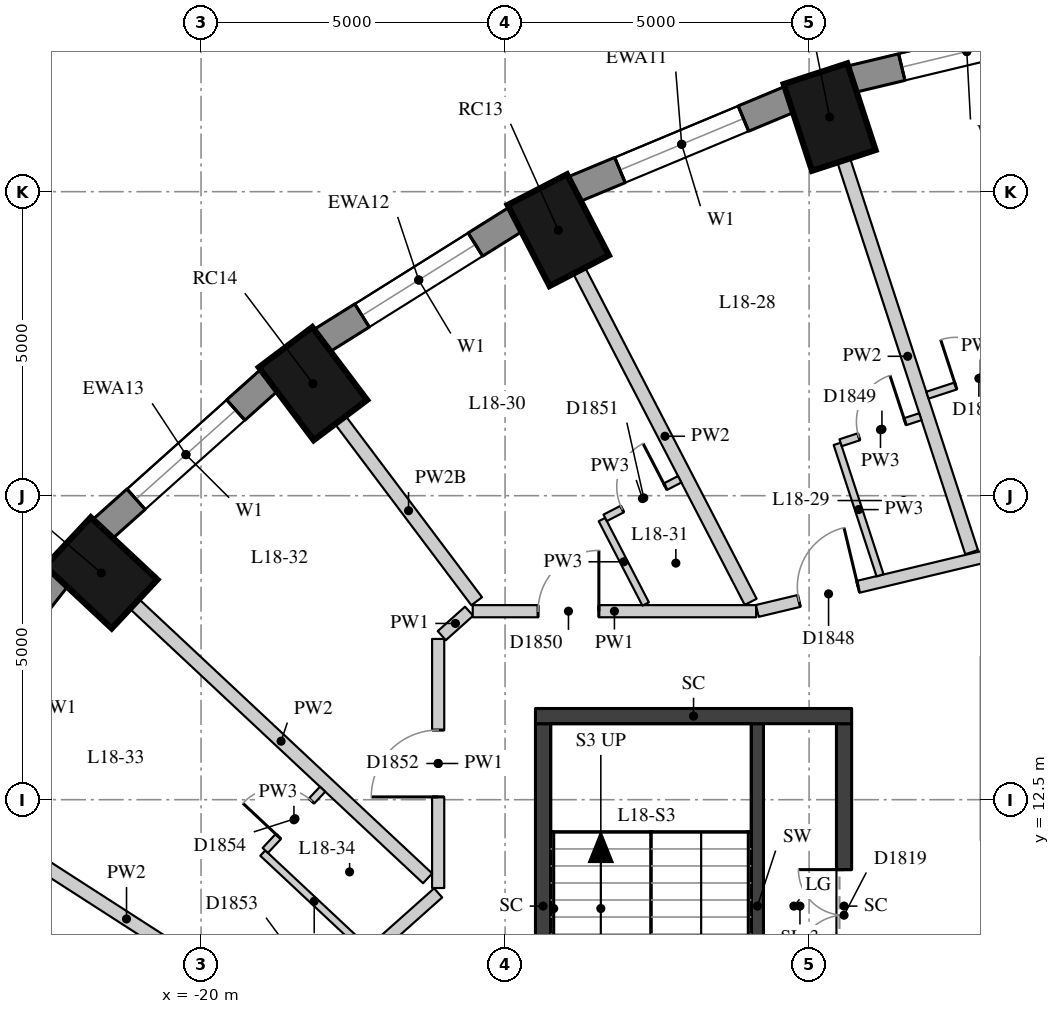
"""IFC4 building model, lengths in metres.
Left out: names, types, materials, properties, quantities, classifications, styles, units other than length and angle.
Written with IfcOpenShell. Run it as: python <this file> out.ifc"""

import sys

from ifc_helpers import new_model, si_unit, direction, frame, frame_2d, origin, origin_2d, place, context, subcontext, project, spatial, rectangle, extrude, element, fill, save


model = new_model("IFC4")
c1 = context("Model", 3, precision=1e-05, world=origin(), true_north=direction((0.0, 1.0)))
c2 = subcontext(c1, "Body", "Model", "MODEL_VIEW")
j1 = project(units=[si_unit("LENGTHUNIT", "METRE"), si_unit("PLANEANGLEUNIT", "RADIAN")], contexts=[c1])
p1 = place(None, origin())
s1 = spatial("IfcSite", under=j1, at=p1, CompositionType="ELEMENT")
p2 = place(p1, origin())
s2 = spatial("IfcBuilding", under=s1, at=p2, CompositionType="ELEMENT")
p3 = place(p2, frame((0.0, 0.0, 67.9)))
s3 = spatial("IfcBuildingStorey", under=s2, at=p3, CompositionType="ELEMENT", Elevation=67.9)
for number, where, z_axis, x_axis in (
    (1, (-9.662, 23.727, 0.0), (0.0, 0.0, 1.0), (-0.31, 0.951, 0.0)),
    (2, (-14.125, 21.867, 0.0), (0.0, 0.0, 1.0), (-0.46, 0.888, 0.0)),
    (3, (-18.159, 19.343, 0.0), (0.0, 0.0, 1.0), (-0.601, 0.799, 0.0)),
    (4, (-21.641, 16.23, 0.0), (0.0, 0.0, 1.0), (-0.73, 0.683, 0.0)),
):
    element("IfcColumn", number, at=place(p3, frame(where, z_axis=z_axis, x_axis=x_axis)), inside=s3, PredefinedType="COLUMN", context=c2, shape_type="SweptSolid", body=[
        extrude(rectangle(XDim=1.5, YDim=1.1, at=origin_2d()), origin(), (0.0, 0.0, 1.0), 3.3),
    ])
p4 = place(p3, frame((-5.504, 25.26, 0.0), z_axis=(0.0, 0.0, 1.0), x_axis=(-0.972496561493, -0.232917233979, 0.0)))
e5 = element("IfcWall", 5, at=p4, inside=s3, PredefinedType="SOLIDWALL", context=c2, shape_type="SweptSolid", body=[
    extrude(rectangle(XDim=3.911, YDim=0.45, at=frame_2d((1.956, 0.0))), origin(), (0.0, 0.0, 1.0), 3.02),
])
p5 = place(p4, frame((0.855, 0.0, 0.4)))
e6 = element("IfcOpeningElement", 6, at=p5, cuts=e5, PredefinedType="OPENING", context=c2, shape_type="SweptSolid", body=[
    extrude(rectangle(XDim=2.2, YDim=1.75, at=frame_2d((1.1, 0.875))), frame((0.0, 0.235, 0.0), z_axis=(0.0, -1.0, 0.0), x_axis=(1.0, 0.0, 0.0)), (0.0, 0.0, 1.0), 0.47),
])
p6 = place(p3, frame((-10.315, 24.021, 0.0), z_axis=(0.0, 0.0, 1.0), x_axis=(-0.923031964282, -0.384723267966, 0.0)))
e7 = element("IfcWall", 7, at=p6, inside=s3, PredefinedType="SOLIDWALL", context=c2, shape_type="SweptSolid", body=[
    extrude(rectangle(XDim=3.856, YDim=0.45, at=frame_2d((1.928, 0.0))), origin(), (0.0, 0.0, 1.0), 3.02),
])
p7 = place(p6, frame((0.828, 0.0, 0.4)))
e8 = element("IfcOpeningElement", 8, at=p7, cuts=e7, PredefinedType="OPENING", context=c2, shape_type="SweptSolid", body=[
    extrude(rectangle(XDim=2.2, YDim=1.75, at=frame_2d((1.1, 0.875))), frame((0.0, 0.235, 0.0), z_axis=(0.0, -1.0, 0.0), x_axis=(1.0, 0.0, 0.0)), (0.0, 0.0, 1.0), 0.47),
])
p8 = place(p3, frame((-14.817, 22.051, 0.0), z_axis=(0.0, 0.0, 1.0), x_axis=(-0.847635480093, -0.530579016629, 0.0)))
e9 = element("IfcWall", 9, at=p8, inside=s3, PredefinedType="SOLIDWALL", context=c2, shape_type="SweptSolid", body=[
    extrude(rectangle(XDim=3.782, YDim=0.45, at=frame_2d((1.891, 0.0))), origin(), (0.0, 0.0, 1.0), 3.02),
])
p9 = place(p8, frame((0.791, 0.0, 0.4)))
e10 = element("IfcOpeningElement", 10, at=p9, cuts=e9, PredefinedType="OPENING", context=c2, shape_type="SweptSolid", body=[
    extrude(rectangle(XDim=2.2, YDim=1.75, at=frame_2d((1.1, 0.875))), frame((0.0, 0.235, 0.0), z_axis=(0.0, -1.0, 0.0), x_axis=(1.0, 0.0, 0.0)), (0.0, 0.0, 1.0), 0.47),
])
p10 = place(p3, frame((-18.871, 19.407, 0.0), z_axis=(0.0, 0.0, 1.0), x_axis=(-0.745526233716, -0.66647628228, 0.0)))
e11 = element("IfcWall", 11, at=p10, inside=s3, PredefinedType="SOLIDWALL", context=c2, shape_type="SweptSolid", body=[
    extrude(rectangle(XDim=3.697, YDim=0.45, at=frame_2d((1.848, 0.0))), origin(), (0.0, 0.0, 1.0), 3.02),
])
p11 = place(p10, frame((0.749, 0.0, 0.4)))
e12 = element("IfcOpeningElement", 12, at=p11, cuts=e11, PredefinedType="OPENING", context=c2, shape_type="SweptSolid", body=[
    extrude(rectangle(XDim=2.2, YDim=1.75, at=frame_2d((1.1, 0.875))), frame((0.0, 0.235, 0.0), z_axis=(0.0, -1.0, 0.0), x_axis=(1.0, 0.0, 0.0)), (0.0, 0.0, 1.0), 0.47),
])
p12 = place(p3, frame((-22.352, 16.17, 0.0), z_axis=(0.0, 0.0, 1.0), x_axis=(-0.616661975264, -0.787228053529, 0.0)))
e13 = element("IfcWall", 13, at=p12, inside=s3, PredefinedType="SOLIDWALL", context=c2, shape_type="SweptSolid", body=[
    extrude(rectangle(XDim=3.61, YDim=0.45, at=frame_2d((1.805, 0.0))), origin(), (0.0, 0.0, 1.0), 3.02),
])
p13 = place(p12, frame((0.705, 0.0, 0.4)))
e14 = element("IfcOpeningElement", 14, at=p13, cuts=e13, PredefinedType="OPENING", context=c2, shape_type="SweptSolid", body=[
    extrude(rectangle(XDim=2.2, YDim=1.75, at=frame_2d((1.1, 0.875))), frame((0.0, 0.235, 0.0), z_axis=(0.0, -1.0, 0.0), x_axis=(1.0, 0.0, 0.0)), (0.0, 0.0, 1.0), 0.47),
])
p14 = place(p3, frame((-10.85, 7.75, 0.0), z_axis=(0.0, 0.0, 1.0), x_axis=(0.0, 1.0, 0.0)))
e15 = element("IfcWall", 15, at=p14, inside=s3, PredefinedType="SHEAR", context=c2, shape_type="SweptSolid", body=[
    extrude(rectangle(XDim=6.0, YDim=0.2, at=frame_2d((3.0, 0.0))), origin(), (0.0, 0.0, 1.0), 3.02),
])
p15 = place(p14, frame((0.1, 0.0, 0.0)))
e16 = element("IfcOpeningElement", 16, at=p15, cuts=e15, PredefinedType="OPENING", context=c2, shape_type="SweptSolid", body=[
    extrude(rectangle(XDim=1.5, YDim=2.1, at=frame_2d((0.75, 1.05))), frame((0.0, 0.11, 0.0), z_axis=(0.0, -1.0, 0.0), x_axis=(1.0, 0.0, 0.0)), (0.0, 0.0, 1.0), 0.22),
])
p16 = place(p3, frame((-14.375, 7.75, -0.28), z_axis=(0.0, 0.0, 1.0), x_axis=(0.0, 1.0, 0.0)))
e17 = element("IfcWall", 17, at=p16, inside=s3, PredefinedType="SHEAR", context=c2, shape_type="SweptSolid", body=[
    extrude(rectangle(XDim=6.0, YDim=0.25, at=frame_2d((3.0, 0.0))), origin(), (0.0, 0.0, 1.0), 3.3),
])
p17 = place(p3, frame((-9.425, 7.75, -0.28), z_axis=(0.0, 0.0, 1.0), x_axis=(0.0, 1.0, 0.0)))
e18 = element("IfcWall", 18, at=p17, inside=s3, PredefinedType="SHEAR", context=c2, shape_type="SweptSolid", body=[
    extrude(rectangle(XDim=6.0, YDim=0.25, at=frame_2d((3.0, 0.0))), origin(), (0.0, 0.0, 1.0), 3.3),
])
p18 = place(p17, frame((2.1, 0.0, 0.28)))
e19 = element("IfcOpeningElement", 19, at=p18, cuts=e18, PredefinedType="OPENING", context=c2, shape_type="SweptSolid", body=[
    extrude(rectangle(XDim=1.5, YDim=2.1, at=frame_2d((0.75, 1.05))), frame((0.0, 0.135, 0.0), z_axis=(0.0, -1.0, 0.0), x_axis=(1.0, 0.0, 0.0)), (0.0, 0.0, 1.0), 0.27),
])
p19 = place(p3, frame((-14.5, 13.875, -0.28), z_axis=(0.0, 0.0, 1.0), x_axis=(1.0, 0.0, 0.0)))
e20 = element("IfcWall", 20, at=p19, inside=s3, PredefinedType="SHEAR", context=c2, shape_type="SweptSolid", body=[
    extrude(rectangle(XDim=5.2, YDim=0.25, at=frame_2d((2.6, 0.0))), origin(), (0.0, 0.0, 1.0), 3.3),
])
p20 = place(p3, frame((-18.527, 8.804, 0.0), z_axis=(0.0, 0.0, 1.0), x_axis=(0.746493000154, 0.665393267716, 0.0)))
e21 = element("IfcWall", 21, at=p20, inside=s3, PredefinedType="PARTITIONING", context=c2, shape_type="SweptSolid", body=[
    extrude(rectangle(XDim=3.251, YDim=0.2, at=frame_2d((1.625, 0.0))), origin(), (0.0, 0.0, 1.0), 3.02),
])
p21 = place(p20, frame((0.22, 0.0, 0.0)))
e22 = element("IfcOpeningElement", 22, at=p21, cuts=e21, PredefinedType="OPENING", context=c2, shape_type="SweptSolid", body=[
    extrude(rectangle(XDim=1.0, YDim=2.1, at=frame_2d((0.5, 1.05))), frame((0.0, 0.11, 0.0), z_axis=(0.0, -1.0, 0.0), x_axis=(1.0, 0.0, 0.0)), (0.0, 0.0, 1.0), 0.22),
])
p22 = place(p3, frame((-16.1, 11.047, 0.0), z_axis=(0.0, 0.0, 1.0), x_axis=(0.0, 1.0, 0.0)))
e23 = element("IfcWall", 23, at=p22, inside=s3, PredefinedType="PARTITIONING", context=c2, shape_type="SweptSolid", body=[
    extrude(rectangle(XDim=4.097, YDim=0.2, at=frame_2d((2.048, 0.0))), origin(), (0.0, 0.0, 1.0), 3.02),
])
p23 = place(p22, frame((1.499, 0.0, 0.0)))
e24 = element("IfcOpeningElement", 24, at=p23, cuts=e23, PredefinedType="OPENING", context=c2, shape_type="SweptSolid", body=[
    extrude(rectangle(XDim=1.1, YDim=2.1, at=frame_2d((0.55, 1.05))), frame((0.0, 0.11, 0.0), z_axis=(0.0, -1.0, 0.0), x_axis=(1.0, 0.0, 0.0)), (0.0, 0.0, 1.0), 0.22),
])
p24 = place(p3, frame((-16.041, 15.198, 0.0), z_axis=(0.0, 0.0, 1.0), x_axis=(0.744722115519, 0.667374685359, 0.0)))
e25 = element("IfcWall", 25, at=p24, inside=s3, PredefinedType="PARTITIONING", context=c2, shape_type="SweptSolid", body=[
    extrude(rectangle(XDim=0.603, YDim=0.2, at=frame_2d((0.301, 0.0))), origin(), (0.0, 0.0, 1.0), 3.02),
])
p25 = place(p3, frame((-15.531, 15.6, 0.0), z_axis=(0.0, 0.0, 1.0), x_axis=(1.0, 0.0, 0.0)))
e26 = element("IfcWall", 26, at=p25, inside=s3, PredefinedType="PARTITIONING", context=c2, shape_type="SweptSolid", body=[
    extrude(rectangle(XDim=4.66, YDim=0.2, at=frame_2d((2.33, 0.0))), origin(), (0.0, 0.0, 1.0), 3.02),
])
p26 = place(p25, frame((1.074, 0.0, 0.0)))
e27 = element("IfcOpeningElement", 27, at=p26, cuts=e26, PredefinedType="OPENING", context=c2, shape_type="SweptSolid", body=[
    extrude(rectangle(XDim=1.0, YDim=2.1, at=frame_2d((0.5, 1.05))), frame((0.0, 0.11, 0.0), z_axis=(0.0, -1.0, 0.0), x_axis=(1.0, 0.0, 0.0)), (0.0, 0.0, 1.0), 0.22),
])
p27 = place(p3, frame((-10.852, 15.605, 0.0), z_axis=(0.0, 0.0, 1.0), x_axis=(0.972573296372, 0.232596610431, 0.0)))
e28 = element("IfcWall", 28, at=p27, inside=s3, PredefinedType="PARTITIONING", context=c2, shape_type="SweptSolid", body=[
    extrude(rectangle(XDim=11.157, YDim=0.2, at=frame_2d((5.579, 0.0))), origin(), (0.0, 0.0, 1.0), 3.02),
])
p28 = place(p27, frame((6.029, 0.0, 0.0)))
e29 = element("IfcOpeningElement", 29, at=p28, cuts=e28, PredefinedType="OPENING", context=c2, shape_type="SweptSolid", body=[
    extrude(rectangle(XDim=1.1, YDim=2.1, at=frame_2d((0.55, 1.05))), frame((0.0, 0.11, 0.0), z_axis=(0.0, -1.0, 0.0), x_axis=(1.0, 0.0, 0.0)), (0.0, 0.0, 1.0), 0.22),
])
p29 = place(p27, frame((0.705, 0.0, 0.0)))
e30 = element("IfcOpeningElement", 30, at=p29, cuts=e28, PredefinedType="OPENING", context=c2, shape_type="SweptSolid", body=[
    extrude(rectangle(XDim=1.0, YDim=2.1, at=frame_2d((0.5, 1.05))), frame((0.0, 0.11, 0.0), z_axis=(0.0, -1.0, 0.0), x_axis=(1.0, 0.0, 0.0)), (0.0, 0.0, 1.0), 0.22),
])
p30 = place(p3, frame((-9.429, 23.014, 0.0), z_axis=(0.0, 0.0, 1.0), x_axis=(0.310223739243, -0.950663574357, 0.0)))
e31 = element("IfcWall", 31, at=p30, inside=s3, PredefinedType="PARTITIONING", context=c2, shape_type="SweptSolid", body=[
    extrude(rectangle(XDim=6.778, YDim=0.22, at=frame_2d((3.389, 0.0))), origin(), (0.0, 0.0, 1.0), 3.02),
])
p31 = place(p3, frame((-13.78, 21.201, 0.0), z_axis=(0.0, 0.0, 1.0), x_axis=(0.459699000582, -0.888074787878, 0.0)))
e32 = element("IfcWall", 32, at=p31, inside=s3, PredefinedType="PARTITIONING", context=c2, shape_type="SweptSolid", body=[
    extrude(rectangle(XDim=6.134, YDim=0.22, at=frame_2d((3.067, 0.0))), origin(), (0.0, 0.0, 1.0), 3.02),
])
p32 = place(p3, frame((-17.708, 18.743, 0.0), z_axis=(0.0, 0.0, 1.0), x_axis=(0.601172757903, -0.799119086967, 0.0)))
e33 = element("IfcWall", 33, at=p32, inside=s3, PredefinedType="PARTITIONING", context=c2, shape_type="SweptSolid", body=[
    extrude(rectangle(XDim=3.729, YDim=0.22, at=frame_2d((1.864, 0.0))), origin(), (0.0, 0.0, 1.0), 2.57),
])
p33 = place(p3, frame((-21.093, 15.718, 0.0), z_axis=(0.0, 0.0, 1.0), x_axis=(0.73009284205, -0.683347965525, 0.0)))
e34 = element("IfcWall", 34, at=p33, inside=s3, PredefinedType="PARTITIONING", context=c2, shape_type="SweptSolid", body=[
    extrude(rectangle(XDim=6.602, YDim=0.22, at=frame_2d((3.301, 0.0))), origin(), (0.0, 0.0, 1.0), 3.02),
])
p34 = place(p3, frame((-23.835, 12.219, 0.0), z_axis=(0.0, 0.0, 1.0), x_axis=(0.840743714791, -0.541433288633, 0.0)))
e35 = element("IfcWall", 35, at=p34, inside=s3, PredefinedType="PARTITIONING", context=c2, shape_type="SweptSolid", body=[
    extrude(rectangle(XDim=6.207, YDim=0.22, at=frame_2d((3.104, 0.0))), origin(), (0.0, 0.0, 1.0), 3.02),
])
p35 = place(p3, frame((-8.833, 16.19, 0.0), z_axis=(0.0, 0.0, 1.0), x_axis=(-0.310231525188, 0.950661033586, 0.0)))
e36 = element("IfcWall", 36, at=p35, inside=s3, PredefinedType="PARTITIONING", context=c2, shape_type="SweptSolid", body=[
    extrude(rectangle(XDim=2.274, YDim=0.12, at=frame_2d((1.137, 0.0))), origin(), (0.0, 0.0, 1.0), 3.02),
])
p36 = place(p3, frame((-12.687, 15.718, 0.0), z_axis=(0.0, 0.0, 1.0), x_axis=(-0.459775159711, 0.888035361071, 0.0)))
e37 = element("IfcWall", 37, at=p36, inside=s3, PredefinedType="PARTITIONING", context=c2, shape_type="SweptSolid", body=[
    extrude(rectangle(XDim=1.565, YDim=0.12, at=frame_2d((0.782, 0.0))), origin(), (0.0, 0.0, 1.0), 3.02),
])
p37 = place(p3, frame((-17.293, 10.038, 0.0), z_axis=(0.0, 0.0, 1.0), x_axis=(-0.730059424734, 0.683383667026, 0.0)))
e38 = element("IfcWall", 38, at=p37, inside=s3, PredefinedType="PARTITIONING", context=c2, shape_type="SweptSolid", body=[
    extrude(rectangle(XDim=2.317, YDim=0.12, at=frame_2d((1.159, 0.0))), origin(), (0.0, 0.0, 1.0), 3.02),
])
p38 = place(p3, frame((-6.314, 19.72, 0.0), z_axis=(0.0, 0.0, 1.0), x_axis=(-0.950639191072, -0.310298450524, 0.0)))
e39 = element("IfcWall", 39, at=p38, inside=s3, PredefinedType="PARTITIONING", context=c2, shape_type="SweptSolid", body=[
    extrude(rectangle(XDim=1.83, YDim=0.12, at=frame_2d((0.915, 0.0))), origin(), (0.0, 0.0, 1.0), 3.02),
])
p39 = place(p38, frame((0.54, 0.0, 0.0)))
e40 = element("IfcOpeningElement", 40, at=p39, cuts=e39, PredefinedType="OPENING", context=c2, shape_type="SweptSolid", body=[
    extrude(rectangle(XDim=0.8, YDim=2.1, at=frame_2d((0.4, 1.05))), frame((0.0, 0.07, 0.0), z_axis=(0.0, -1.0, 0.0), x_axis=(1.0, 0.0, 0.0)), (0.0, 0.0, 1.0), 0.14),
])
p40 = place(p3, frame((-9.481, 18.371, 0.0), z_axis=(0.0, 0.0, 1.0), x_axis=(0.950576687533, 0.310489872812, 0.0)))
e41 = element("IfcWall", 41, at=p40, inside=s3, PredefinedType="PARTITIONING", context=c2, shape_type="SweptSolid", body=[
    extrude(rectangle(XDim=1.38, YDim=0.12, at=frame_2d((0.69, 0.0))), origin(), (0.0, 0.0, 1.0), 3.02),
])
p41 = place(p40, frame((0.315, 0.0, 0.0)))
e42 = element("IfcOpeningElement", 42, at=p41, cuts=e41, PredefinedType="OPENING", context=c2, shape_type="SweptSolid", body=[
    extrude(rectangle(XDim=0.8, YDim=2.1, at=frame_2d((0.4, 1.05))), frame((0.0, 0.07, 0.0), z_axis=(0.0, -1.0, 0.0), x_axis=(1.0, 0.0, 0.0)), (0.0, 0.0, 1.0), 0.14),
])
p42 = place(p3, frame((-13.353, 17.135, 0.0), z_axis=(0.0, 0.0, 1.0), x_axis=(0.888075681402, 0.459697274413, 0.0)))
e43 = element("IfcWall", 43, at=p42, inside=s3, PredefinedType="PARTITIONING", context=c2, shape_type="SweptSolid", body=[
    extrude(rectangle(XDim=1.38, YDim=0.12, at=frame_2d((0.69, 0.0))), origin(), (0.0, 0.0, 1.0), 3.02),
])
p43 = place(p42, frame((0.315, 0.0, 0.0)))
e44 = element("IfcOpeningElement", 44, at=p43, cuts=e43, PredefinedType="OPENING", context=c2, shape_type="SweptSolid", body=[
    extrude(rectangle(XDim=0.8, YDim=2.1, at=frame_2d((0.4, 1.05))), frame((0.0, 0.07, 0.0), z_axis=(0.0, -1.0, 0.0), x_axis=(1.0, 0.0, 0.0)), (0.0, 0.0, 1.0), 0.14),
])
p44 = place(p3, frame((-18.943, 11.665, 0.0), z_axis=(0.0, 0.0, 1.0), x_axis=(0.683364094355, 0.730077745549, 0.0)))
e45 = element("IfcWall", 45, at=p44, inside=s3, PredefinedType="PARTITIONING", context=c2, shape_type="SweptSolid", body=[
    extrude(rectangle(XDim=1.38, YDim=0.12, at=frame_2d((0.69, 0.0))), origin(), (0.0, 0.0, 1.0), 3.02),
])
p45 = place(p44, frame((0.315, 0.0, 0.0)))
e46 = element("IfcOpeningElement", 46, at=p45, cuts=e45, PredefinedType="OPENING", context=c2, shape_type="SweptSolid", body=[
    extrude(rectangle(XDim=0.8, YDim=2.1, at=frame_2d((0.4, 1.05))), frame((0.0, 0.07, 0.0), z_axis=(0.0, -1.0, 0.0), x_axis=(1.0, 0.0, 0.0)), (0.0, 0.0, 1.0), 0.14),
])
p46 = place(p5, origin())
e47 = element("IfcWindow", 47, at=p46, inside=s3, PartitioningType="SINGLE_PANEL", PredefinedType="WINDOW", context=c2, shape_type="SweptSolid", body=[
    extrude(rectangle(XDim=2.2, YDim=1.75, at=frame_2d((1.1, 0.875))), frame((0.0, 0.035, 0.0), z_axis=(0.0, -1.0, 0.0), x_axis=(1.0, 0.0, 0.0)), (0.0, 0.0, 1.0), 0.06),
])
fill(e6, e47)
p47 = place(p7, origin())
e48 = element("IfcWindow", 48, at=p47, inside=s3, PartitioningType="SINGLE_PANEL", PredefinedType="WINDOW", context=c2, shape_type="SweptSolid", body=[
    extrude(rectangle(XDim=2.2, YDim=1.75, at=frame_2d((1.1, 0.875))), frame((0.0, 0.035, 0.0), z_axis=(0.0, -1.0, 0.0), x_axis=(1.0, 0.0, 0.0)), (0.0, 0.0, 1.0), 0.06),
])
fill(e8, e48)
p48 = place(p9, origin())
e49 = element("IfcWindow", 49, at=p48, inside=s3, PartitioningType="SINGLE_PANEL", PredefinedType="WINDOW", context=c2, shape_type="SweptSolid", body=[
    extrude(rectangle(XDim=2.2, YDim=1.75, at=frame_2d((1.1, 0.875))), frame((0.0, 0.035, 0.0), z_axis=(0.0, -1.0, 0.0), x_axis=(1.0, 0.0, 0.0)), (0.0, 0.0, 1.0), 0.06),
])
fill(e10, e49)
p49 = place(p11, origin())
e50 = element("IfcWindow", 50, at=p49, inside=s3, PartitioningType="SINGLE_PANEL", PredefinedType="WINDOW", context=c2, shape_type="SweptSolid", body=[
    extrude(rectangle(XDim=2.2, YDim=1.75, at=frame_2d((1.1, 0.875))), frame((0.0, 0.035, 0.0), z_axis=(0.0, -1.0, 0.0), x_axis=(1.0, 0.0, 0.0)), (0.0, 0.0, 1.0), 0.06),
])
fill(e12, e50)
p50 = place(p18, origin())
e51 = element("IfcDoor", 51, at=p50, inside=s3, OperationType="DOUBLE_DOOR_SINGLE_SWING", PredefinedType="DOOR", context=c2, shape_type="SweptSolid", body=[
    extrude(rectangle(XDim=1.5, YDim=2.1, at=frame_2d((0.75, 1.05))), frame((0.0, 0.025, 0.0), z_axis=(0.0, -1.0, 0.0), x_axis=(1.0, 0.0, 0.0)), (0.0, 0.0, 1.0), 0.05),
])
fill(e19, e51)
p51 = place(p39, origin())
e52 = element("IfcDoor", 52, at=p51, inside=s3, OperationType="SINGLE_SWING_LEFT", PredefinedType="DOOR", context=c2, shape_type="SweptSolid", body=[
    extrude(rectangle(XDim=0.8, YDim=2.1, at=frame_2d((0.4, 1.05))), frame((0.0, 0.025, 0.0), z_axis=(0.0, -1.0, 0.0), x_axis=(1.0, 0.0, 0.0)), (0.0, 0.0, 1.0), 0.05),
])
fill(e40, e52)
p52 = place(p29, origin())
e53 = element("IfcDoor", 53, at=p52, inside=s3, OperationType="SINGLE_SWING_RIGHT", PredefinedType="DOOR", context=c2, shape_type="SweptSolid", body=[
    extrude(rectangle(XDim=1.0, YDim=2.1, at=frame_2d((0.5, 1.05))), frame((0.0, 0.025, 0.0), z_axis=(0.0, -1.0, 0.0), x_axis=(1.0, 0.0, 0.0)), (0.0, 0.0, 1.0), 0.05),
])
fill(e30, e53)
p53 = place(p41, origin())
e54 = element("IfcDoor", 54, at=p53, inside=s3, OperationType="SINGLE_SWING_RIGHT", PredefinedType="DOOR", context=c2, shape_type="SweptSolid", body=[
    extrude(rectangle(XDim=0.8, YDim=2.1, at=frame_2d((0.4, 1.05))), frame((0.0, 0.025, 0.0), z_axis=(0.0, -1.0, 0.0), x_axis=(1.0, 0.0, 0.0)), (0.0, 0.0, 1.0), 0.05),
])
fill(e42, e54)
p54 = place(p26, origin())
e55 = element("IfcDoor", 55, at=p54, inside=s3, OperationType="SINGLE_SWING_RIGHT", PredefinedType="DOOR", context=c2, shape_type="SweptSolid", body=[
    extrude(rectangle(XDim=1.0, YDim=2.1, at=frame_2d((0.5, 1.05))), frame((0.0, 0.025, 0.0), z_axis=(0.0, -1.0, 0.0), x_axis=(1.0, 0.0, 0.0)), (0.0, 0.0, 1.0), 0.05),
])
fill(e27, e55)
p55 = place(p43, origin())
e56 = element("IfcDoor", 56, at=p55, inside=s3, OperationType="SINGLE_SWING_RIGHT", PredefinedType="DOOR", context=c2, shape_type="SweptSolid", body=[
    extrude(rectangle(XDim=0.8, YDim=2.1, at=frame_2d((0.4, 1.05))), frame((0.0, 0.025, 0.0), z_axis=(0.0, -1.0, 0.0), x_axis=(1.0, 0.0, 0.0)), (0.0, 0.0, 1.0), 0.05),
])
fill(e44, e56)
p56 = place(p23, origin())
e57 = element("IfcDoor", 57, at=p56, inside=s3, OperationType="SINGLE_SWING_LEFT", PredefinedType="DOOR", context=c2, shape_type="SweptSolid", body=[
    extrude(rectangle(XDim=1.1, YDim=2.1, at=frame_2d((0.55, 1.05))), frame((0.0, 0.025, 0.0), z_axis=(0.0, -1.0, 0.0), x_axis=(1.0, 0.0, 0.0)), (0.0, 0.0, 1.0), 0.05),
])
fill(e24, e57)
p57 = place(p45, origin())
e58 = element("IfcDoor", 58, at=p57, inside=s3, OperationType="SINGLE_SWING_LEFT", PredefinedType="DOOR", context=c2, shape_type="SweptSolid", body=[
    extrude(rectangle(XDim=0.8, YDim=2.1, at=frame_2d((0.4, 1.05))), frame((0.0, 0.025, 0.0), z_axis=(0.0, -1.0, 0.0), x_axis=(1.0, 0.0, 0.0)), (0.0, 0.0, 1.0), 0.05),
])
fill(e46, e58)
save(model, sys.argv[1])
